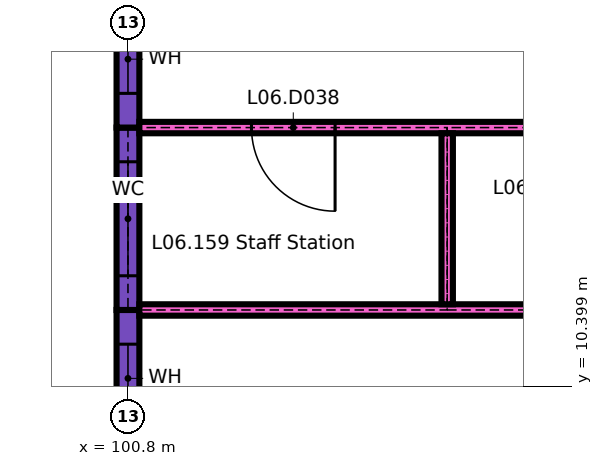
"""IFC4 building model, lengths in metres.
Left out: names, types, materials, properties, quantities, classifications, styles, units other than length and angle.
Written with IfcOpenShell. Run it as: python <this file> out.ifc"""

import sys

from ifc_helpers import new_model, si_unit, direction, frame, frame_2d, origin, place, context, subcontext, project, spatial, rectangle, extrude, element, fill, save


model = new_model("IFC4")
c1 = context("Model", 3, precision=1e-05, world=origin(), true_north=direction((0.0, 1.0)))
c2 = subcontext(c1, "Body", "Model", "MODEL_VIEW")
j1 = project(units=[si_unit("LENGTHUNIT", "METRE"), si_unit("PLANEANGLEUNIT", "RADIAN")], contexts=[c1])
p1 = place(None, origin())
s1 = spatial("IfcSite", under=j1, at=p1, CompositionType="ELEMENT")
p2 = place(p1, origin())
s2 = spatial("IfcBuilding", under=s1, at=p2, CompositionType="ELEMENT")
p3 = place(p2, frame((0.0, 0.0, 26.1)))
s3 = spatial("IfcBuildingStorey", under=s2, at=p3, CompositionType="ELEMENT", Elevation=26.1)
p4 = place(p3, frame((100.8, 8.4, 0.0), z_axis=(0.0, 0.0, 1.0), x_axis=(0.0, 1.0, 0.0)))
e1 = element("IfcWall", 1, at=p4, inside=s3, PredefinedType="SOLIDWALL", context=c2, shape_type="SweptSolid", body=[
    extrude(rectangle(XDim=3.0, YDim=0.3, at=frame_2d((1.5, 0.0))), origin(), (0.0, 0.0, 1.0), 3.3),
])
p5 = place(p4, frame((1.65, 0.0, 0.9)))
e2 = element("IfcOpeningElement", 2, at=p5, cuts=e1, PredefinedType="OPENING", context=c2, shape_type="SweptSolid", body=[
    extrude(rectangle(XDim=0.9, YDim=1.5, at=frame_2d((0.45, 0.75))), frame((0.0, 0.16, 0.0), z_axis=(0.0, -1.0, 0.0), x_axis=(1.0, 0.0, 0.0)), (0.0, 0.0, 1.0), 0.32),
])
p6 = place(p3, frame((100.8, 11.4, 0.0), z_axis=(0.0, 0.0, 1.0), x_axis=(0.0, 1.0, 0.0)))
e3 = element("IfcWall", 3, at=p6, inside=s3, PredefinedType="SOLIDWALL", context=c2, shape_type="SweptSolid", body=[
    extrude(rectangle(XDim=2.4, YDim=0.3, at=frame_2d((1.2, 0.0))), origin(), (0.0, 0.0, 1.0), 3.3),
])
p7 = place(p6, frame((0.45, 0.0, 0.9)))
e4 = element("IfcOpeningElement", 4, at=p7, cuts=e3, PredefinedType="OPENING", context=c2, shape_type="SweptSolid", body=[
    extrude(rectangle(XDim=1.5, YDim=1.5, at=frame_2d((0.75, 0.75))), frame((0.0, 0.16, 0.0), z_axis=(0.0, -1.0, 0.0), x_axis=(1.0, 0.0, 0.0)), (0.0, 0.0, 1.0), 0.32),
])
p8 = place(p3, frame((100.8, 13.8, 0.0), z_axis=(0.0, 0.0, 1.0), x_axis=(0.0, 1.0, 0.0)))
e5 = element("IfcWall", 5, at=p8, inside=s3, PredefinedType="SOLIDWALL", context=c2, shape_type="SweptSolid", body=[
    extrude(rectangle(XDim=2.625, YDim=0.3, at=frame_2d((1.312, 0.0))), origin(), (0.0, 0.0, 1.0), 3.3),
])
p9 = place(p8, frame((0.45, 0.0, 0.9)))
e6 = element("IfcOpeningElement", 6, at=p9, cuts=e5, PredefinedType="OPENING", context=c2, shape_type="SweptSolid", body=[
    extrude(rectangle(XDim=0.9, YDim=1.5, at=frame_2d((0.45, 0.75))), frame((0.0, 0.16, 0.0), z_axis=(0.0, -1.0, 0.0), x_axis=(1.0, 0.0, 0.0)), (0.0, 0.0, 1.0), 0.32),
])
p10 = place(p3, frame((100.95, 11.4, 0.0), z_axis=(0.0, 0.0, 1.0), x_axis=(1.0, 0.0, 0.0)))
e7 = element("IfcWall", 7, at=p10, inside=s3, PredefinedType="PARTITIONING", context=c2, shape_type="SweptSolid", body=[
    extrude(rectangle(XDim=8.325, YDim=0.15, at=frame_2d((4.163, 0.0))), origin(), (0.0, 0.0, 1.0), 3.3),
])
p11 = place(p10, frame((5.6, 0.0, 0.0)))
e8 = element("IfcOpeningElement", 8, at=p11, cuts=e7, PredefinedType="OPENING", context=c2, shape_type="SweptSolid", body=[
    extrude(rectangle(XDim=1.1, YDim=2.1, at=frame_2d((0.55, 1.05))), frame((0.0, 0.085, 0.0), z_axis=(0.0, -1.0, 0.0), x_axis=(1.0, 0.0, 0.0)), (0.0, 0.0, 1.0), 0.17),
])
p12 = place(p3, frame((100.95, 13.8, 0.0), z_axis=(0.0, 0.0, 1.0), x_axis=(1.0, 0.0, 0.0)))
e9 = element("IfcWall", 9, at=p12, inside=s3, PredefinedType="PARTITIONING", context=c2, shape_type="SweptSolid", body=[
    extrude(rectangle(XDim=8.325, YDim=0.15, at=frame_2d((4.163, 0.0))), origin(), (0.0, 0.0, 1.0), 3.3),
])
p13 = place(p12, frame((1.475, 0.0, 0.0)))
e10 = element("IfcOpeningElement", 10, at=p13, cuts=e9, PredefinedType="OPENING", context=c2, shape_type="SweptSolid", body=[
    extrude(rectangle(XDim=1.1, YDim=2.1, at=frame_2d((0.55, 1.05))), frame((0.0, 0.085, 0.0), z_axis=(0.0, -1.0, 0.0), x_axis=(1.0, 0.0, 0.0)), (0.0, 0.0, 1.0), 0.17),
])
p14 = place(p3, frame((105.0, 11.475, 0.0), z_axis=(0.0, 0.0, 1.0), x_axis=(0.0, 1.0, 0.0)))
e11 = element("IfcWall", 11, at=p14, inside=s3, PredefinedType="PARTITIONING", context=c2, shape_type="SweptSolid", body=[
    extrude(rectangle(XDim=2.25, YDim=0.15, at=frame_2d((1.125, 0.0))), origin(), (0.0, 0.0, 1.0), 3.3),
])
p15 = place(p5, origin())
e12 = element("IfcWindow", 12, at=p15, inside=s3, PartitioningType="SINGLE_PANEL", PredefinedType="WINDOW", context=c2, shape_type="SweptSolid", body=[
    extrude(rectangle(XDim=0.9, YDim=1.5, at=frame_2d((0.45, 0.75))), frame((0.0, 0.03, 0.0), z_axis=(0.0, -1.0, 0.0), x_axis=(1.0, 0.0, 0.0)), (0.0, 0.0, 1.0), 0.06),
])
fill(e2, e12)
p16 = place(p7, origin())
e13 = element("IfcWindow", 13, at=p16, inside=s3, PartitioningType="SINGLE_PANEL", PredefinedType="WINDOW", context=c2, shape_type="SweptSolid", body=[
    extrude(rectangle(XDim=1.5, YDim=1.5, at=frame_2d((0.75, 0.75))), frame((0.0, 0.03, 0.0), z_axis=(0.0, -1.0, 0.0), x_axis=(1.0, 0.0, 0.0)), (0.0, 0.0, 1.0), 0.06),
])
fill(e4, e13)
p17 = place(p9, origin())
e14 = element("IfcWindow", 14, at=p17, inside=s3, PartitioningType="SINGLE_PANEL", PredefinedType="WINDOW", context=c2, shape_type="SweptSolid", body=[
    extrude(rectangle(XDim=0.9, YDim=1.5, at=frame_2d((0.45, 0.75))), frame((0.0, 0.03, 0.0), z_axis=(0.0, -1.0, 0.0), x_axis=(1.0, 0.0, 0.0)), (0.0, 0.0, 1.0), 0.06),
])
fill(e6, e14)
p18 = place(p13, origin())
e15 = element("IfcDoor", 15, at=p18, inside=s3, OperationType="SINGLE_SWING_RIGHT", PredefinedType="DOOR", context=c2, shape_type="SweptSolid", body=[
    extrude(rectangle(XDim=1.1, YDim=2.1, at=frame_2d((0.55, 1.05))), frame((0.0, 0.025, 0.0), z_axis=(0.0, -1.0, 0.0), x_axis=(1.0, 0.0, 0.0)), (0.0, 0.0, 1.0), 0.05),
])
fill(e10, e15)
save(model, sys.argv[1])
